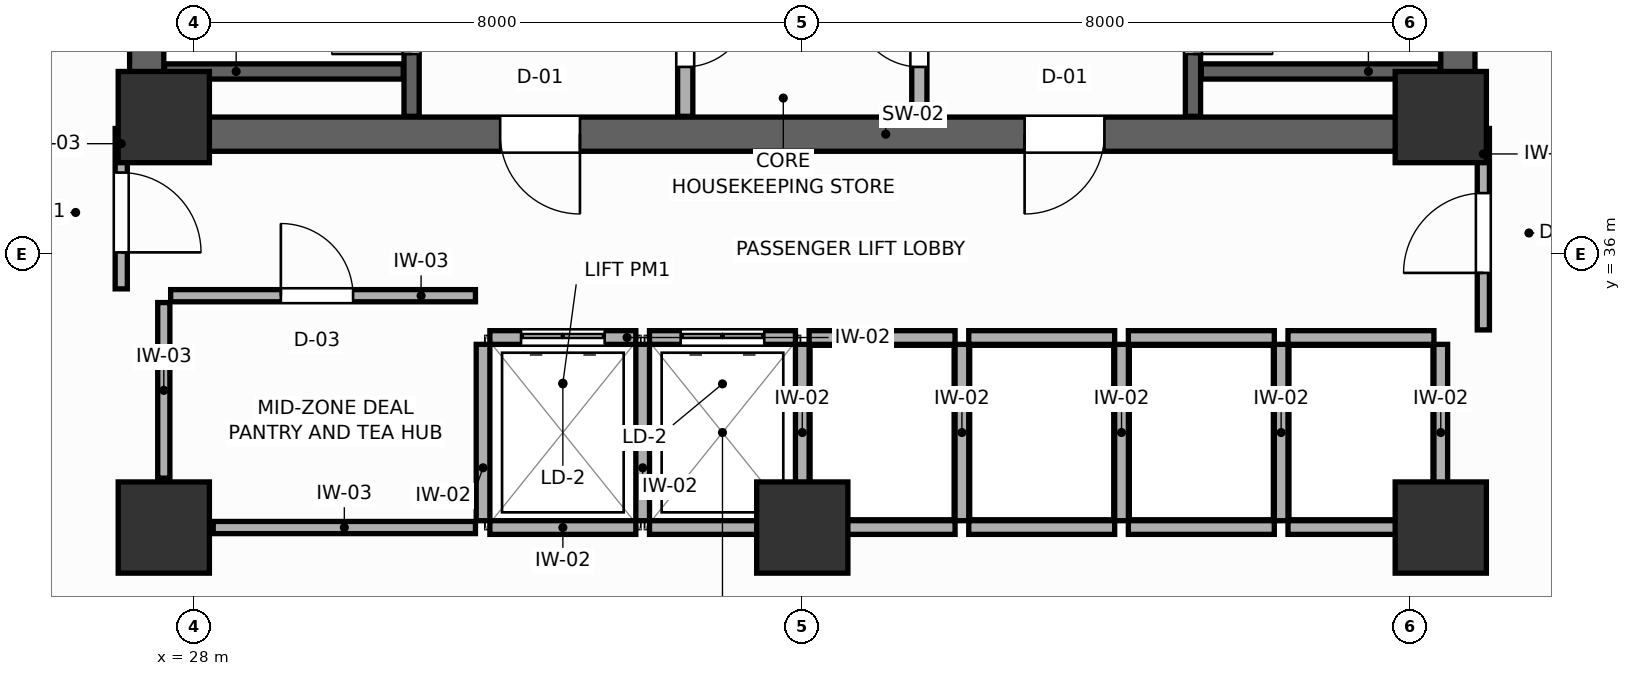
"""IFC4 building model, lengths in metres.
Left out: names, types, materials, properties, quantities, classifications, styles, units other than length and angle.
Written with IfcOpenShell. Run it as: python <this file> out.ifc"""

import sys

from ifc_helpers import new_model, si_unit, direction, frame, frame_2d, origin, origin_2d, place, context, subcontext, project, spatial, rectangle, extrude, source, transform, mapped, element, fill, save


model = new_model("IFC4")
c1 = context("Model", 3, precision=1e-05, world=origin(), true_north=direction((0.0, 1.0)))
c2 = subcontext(c1, "Body", "Model", "MODEL_VIEW")
j1 = project(units=[si_unit("LENGTHUNIT", "METRE"), si_unit("PLANEANGLEUNIT", "RADIAN")], contexts=[c1])
p1 = place(None, origin())
s1 = spatial("IfcSite", under=j1, at=p1, CompositionType="ELEMENT")
p2 = place(p1, origin())
s2 = spatial("IfcBuilding", under=s1, at=p2, CompositionType="ELEMENT")
p3 = place(p2, frame((0.0, 0.0, 147.0)))
s3 = spatial("IfcBuildingStorey", under=s2, at=p3, CompositionType="ELEMENT", Elevation=147.0)
p4 = place(p3, frame((27.15, 37.575, 0.0), z_axis=(0.0, 0.0, 1.0), x_axis=(1.0, 0.0, 0.0)))
e1 = element("IfcWall", 1, at=p4, inside=s3, PredefinedType="SHEAR", context=c2, shape_type="SweptSolid", body=[
    extrude(rectangle(XDim=17.7, YDim=0.45, at=frame_2d((8.85, 0.0))), origin(), (0.0, 0.0, 1.0), 3.6),
])
p5 = place(p4, frame((4.875, 0.0, 0.0)))
e2 = element("IfcOpeningElement", 2, at=p5, cuts=e1, PredefinedType="OPENING", context=c2, shape_type="SweptSolid", body=[
    extrude(rectangle(XDim=1.05, YDim=2.1, at=frame_2d((0.525, 1.05))), frame((0.0, 0.235, 0.0), z_axis=(0.0, -1.0, 0.0), x_axis=(1.0, 0.0, 0.0)), (0.0, 0.0, 1.0), 0.47),
])
p6 = place(p4, frame((11.775, 0.0, 0.0)))
e3 = element("IfcOpeningElement", 3, at=p6, cuts=e1, PredefinedType="OPENING", context=c2, shape_type="SweptSolid", body=[
    extrude(rectangle(XDim=1.05, YDim=2.1, at=frame_2d((0.525, 1.05))), frame((0.0, 0.235, 0.0), z_axis=(0.0, -1.0, 0.0), x_axis=(1.0, 0.0, 0.0)), (0.0, 0.0, 1.0), 0.47),
])
for number, where, z_axis, x_axis in (
    (4, (27.375, 37.8, 0.0), (0.0, 0.0, 1.0), (0.0, 1.0, 0.0)),
    (5, (44.625, 37.8, 0.0), (0.0, 0.0, 1.0), (0.0, 1.0, 0.0)),
):
    element("IfcWall", number, at=place(p3, frame(where, z_axis=z_axis, x_axis=x_axis)), inside=s3, PredefinedType="SHEAR", context=c2, shape_type="SweptSolid", body=[
        extrude(rectangle(XDim=9.0, YDim=0.45, at=frame_2d((4.5, 0.0))), origin(), (0.0, 0.0, 1.0), 3.6),
    ])
m1 = source(origin(), c2, "Body", "SweptSolid", [
    extrude(rectangle(XDim=1.2, YDim=1.2, at=origin_2d()), origin(), (0.0, 0.0, 1.0), 3.6),
])
for number, where, z_axis, x_axis in (
    (6, (27.6, 37.8, 0.0), (0.0, 0.0, 1.0), (1.0, 0.0, 0.0)),
    (7, (44.4, 37.8, 0.0), (0.0, 0.0, 1.0), (1.0, 0.0, 0.0)),
    (8, (27.6, 32.4, 0.0), (0.0, 0.0, 1.0), (1.0, 0.0, 0.0)),
    (9, (44.4, 32.4, 0.0), (0.0, 0.0, 1.0), (1.0, 0.0, 0.0)),
    (10, (36.0, 32.4, 0.0), (0.0, 0.0, 1.0), (1.0, 0.0, 0.0)),
):
    element("IfcColumn", number, at=place(p3, frame(where, z_axis=z_axis, x_axis=x_axis)), inside=s3, PredefinedType="COLUMN", context=c2, shape_type="MappedRepresentation", body=[
        mapped(m1, transform((0.0, 0.0, 0.0), scale=1.0)),
    ])
p7 = place(p3, frame((30.86, 37.81, 0.0), z_axis=(0.0, 0.0, 1.0), x_axis=(0.0, 1.0, 0.0)))
e11 = element("IfcWall", 11, at=p7, inside=s3, PredefinedType="SHEAR", context=c2, shape_type="SweptSolid", body=[
    extrude(rectangle(XDim=8.98, YDim=0.2, at=frame_2d((4.49, 0.0))), origin(), (0.0, 0.0, 1.0), 3.6),
])
p8 = place(p7, frame((0.82, 0.0, 0.0)))
e12 = element("IfcOpeningElement", 12, at=p8, cuts=e11, PredefinedType="OPENING", context=c2, shape_type="SweptSolid", body=[
    extrude(rectangle(XDim=1.05, YDim=2.1, at=frame_2d((0.525, 1.05))), frame((0.0, 0.11, 0.0), z_axis=(0.0, -1.0, 0.0), x_axis=(1.0, 0.0, 0.0)), (0.0, 0.0, 1.0), 0.22),
])
p9 = place(p3, frame((27.61, 38.4, 0.0), z_axis=(0.0, 0.0, 1.0), x_axis=(1.0, 0.0, 0.0)))
e13 = element("IfcWall", 13, at=p9, inside=s3, PredefinedType="SHEAR", context=c2, shape_type="SweptSolid", body=[
    extrude(rectangle(XDim=3.14, YDim=0.2, at=frame_2d((1.57, 0.0))), origin(), (0.0, 0.0, 1.0), 3.6),
])
p10 = place(p3, frame((41.14, 37.81, 0.0), z_axis=(0.0, 0.0, 1.0), x_axis=(0.0, 1.0, 0.0)))
e14 = element("IfcWall", 14, at=p10, inside=s3, PredefinedType="SHEAR", context=c2, shape_type="SweptSolid", body=[
    extrude(rectangle(XDim=8.98, YDim=0.2, at=frame_2d((4.49, 0.0))), origin(), (0.0, 0.0, 1.0), 3.6),
])
p11 = place(p10, frame((0.82, 0.0, 0.0)))
e15 = element("IfcOpeningElement", 15, at=p11, cuts=e14, PredefinedType="OPENING", context=c2, shape_type="SweptSolid", body=[
    extrude(rectangle(XDim=1.05, YDim=2.1, at=frame_2d((0.525, 1.05))), frame((0.0, 0.11, 0.0), z_axis=(0.0, -1.0, 0.0), x_axis=(1.0, 0.0, 0.0)), (0.0, 0.0, 1.0), 0.22),
])
p12 = place(p3, frame((41.25, 38.4, 0.0), z_axis=(0.0, 0.0, 1.0), x_axis=(1.0, 0.0, 0.0)))
e16 = element("IfcWall", 16, at=p12, inside=s3, PredefinedType="SHEAR", context=c2, shape_type="SweptSolid", body=[
    extrude(rectangle(XDim=3.14, YDim=0.2, at=frame_2d((1.57, 0.0))), origin(), (0.0, 0.0, 1.0), 3.6),
])
p13 = place(p3, frame((34.46, 37.81, 0.0), z_axis=(0.0, 0.0, 1.0), x_axis=(0.0, 1.0, 0.0)))
e17 = element("IfcWall", 17, at=p13, inside=s3, PredefinedType="PARTITIONING", context=c2, shape_type="SweptSolid", body=[
    extrude(rectangle(XDim=8.98, YDim=0.2, at=frame_2d((4.49, 0.0))), origin(), (0.0, 0.0, 1.0), 3.4),
])
p14 = place(p13, frame((0.65, 0.0, 0.0)))
e18 = element("IfcOpeningElement", 18, at=p14, cuts=e17, PredefinedType="OPENING", context=c2, shape_type="SweptSolid", body=[
    extrude(rectangle(XDim=0.85, YDim=2.05, at=frame_2d((0.425, 1.025))), frame((0.0, 0.11, 0.0), z_axis=(0.0, -1.0, 0.0), x_axis=(1.0, 0.0, 0.0)), (0.0, 0.0, 1.0), 0.22),
])
p15 = place(p3, frame((37.54, 37.81, 0.0), z_axis=(0.0, 0.0, 1.0), x_axis=(0.0, 1.0, 0.0)))
e19 = element("IfcWall", 19, at=p15, inside=s3, PredefinedType="PARTITIONING", context=c2, shape_type="SweptSolid", body=[
    extrude(rectangle(XDim=8.98, YDim=0.2, at=frame_2d((4.49, 0.0))), origin(), (0.0, 0.0, 1.0), 3.4),
])
p16 = place(p15, frame((0.65, 0.0, 0.0)))
e20 = element("IfcOpeningElement", 20, at=p16, cuts=e19, PredefinedType="OPENING", context=c2, shape_type="SweptSolid", body=[
    extrude(rectangle(XDim=0.85, YDim=2.05, at=frame_2d((0.425, 1.025))), frame((0.0, 0.11, 0.0), z_axis=(0.0, -1.0, 0.0), x_axis=(1.0, 0.0, 0.0)), (0.0, 0.0, 1.0), 0.22),
])
p17 = place(p3, frame((31.89, 34.9, 0.0), z_axis=(0.0, 0.0, 1.0), x_axis=(1.0, 0.0, 0.0)))
e21 = element("IfcWall", 21, at=p17, inside=s3, PredefinedType="PARTITIONING", context=c2, shape_type="SweptSolid", body=[
    extrude(rectangle(XDim=1.92, YDim=0.18, at=frame_2d((0.96, 0.0))), origin(), (0.0, 0.0, 1.0), 3.4),
])
p18 = place(p17, frame((0.41, 0.0, 0.0)))
e22 = element("IfcOpeningElement", 22, at=p18, cuts=e21, PredefinedType="OPENING", context=c2, shape_type="SweptSolid", body=[
    extrude(rectangle(XDim=1.1, YDim=2.1, at=frame_2d((0.55, 1.05))), frame((0.0, 0.1, 0.0), z_axis=(0.0, -1.0, 0.0), x_axis=(1.0, 0.0, 0.0)), (0.0, 0.0, 1.0), 0.2),
])
p19 = place(p3, frame((31.89, 32.4, 0.0), z_axis=(0.0, 0.0, 1.0), x_axis=(1.0, 0.0, 0.0)))
e23 = element("IfcWall", 23, at=p19, inside=s3, PredefinedType="PARTITIONING", context=c2, shape_type="SweptSolid", body=[
    extrude(rectangle(XDim=1.92, YDim=0.18, at=frame_2d((0.96, 0.0))), origin(), (0.0, 0.0, 1.0), 2.95),
])
p20 = place(p3, frame((31.8, 32.49, 0.0), z_axis=(0.0, 0.0, 1.0), x_axis=(0.0, 1.0, 0.0)))
e24 = element("IfcWall", 24, at=p20, inside=s3, PredefinedType="PARTITIONING", context=c2, shape_type="SweptSolid", body=[
    extrude(rectangle(XDim=2.32, YDim=0.18, at=frame_2d((1.16, 0.0))), origin(), (0.0, 0.0, 1.0), 3.4),
])
p21 = place(p3, frame((33.99, 34.9, 0.0), z_axis=(0.0, 0.0, 1.0), x_axis=(1.0, 0.0, 0.0)))
e25 = element("IfcWall", 25, at=p21, inside=s3, PredefinedType="PARTITIONING", context=c2, shape_type="SweptSolid", body=[
    extrude(rectangle(XDim=1.92, YDim=0.18, at=frame_2d((0.96, 0.0))), origin(), (0.0, 0.0, 1.0), 3.4),
])
p22 = place(p21, frame((0.41, 0.0, 0.0)))
e26 = element("IfcOpeningElement", 26, at=p22, cuts=e25, PredefinedType="OPENING", context=c2, shape_type="SweptSolid", body=[
    extrude(rectangle(XDim=1.1, YDim=2.1, at=frame_2d((0.55, 1.05))), frame((0.0, 0.1, 0.0), z_axis=(0.0, -1.0, 0.0), x_axis=(1.0, 0.0, 0.0)), (0.0, 0.0, 1.0), 0.2),
])
p23 = place(p3, frame((33.99, 32.4, 0.0), z_axis=(0.0, 0.0, 1.0), x_axis=(1.0, 0.0, 0.0)))
e27 = element("IfcWall", 27, at=p23, inside=s3, PredefinedType="PARTITIONING", context=c2, shape_type="SweptSolid", body=[
    extrude(rectangle(XDim=1.92, YDim=0.18, at=frame_2d((0.96, 0.0))), origin(), (0.0, 0.0, 1.0), 2.95),
])
p24 = place(p3, frame((33.9, 32.49, 0.0), z_axis=(0.0, 0.0, 1.0), x_axis=(0.0, 1.0, 0.0)))
e28 = element("IfcWall", 28, at=p24, inside=s3, PredefinedType="PARTITIONING", context=c2, shape_type="SweptSolid", body=[
    extrude(rectangle(XDim=2.32, YDim=0.18, at=frame_2d((1.16, 0.0))), origin(), (0.0, 0.0, 1.0), 3.4),
])
p25 = place(p3, frame((36.09, 34.9, 0.0), z_axis=(0.0, 0.0, 1.0), x_axis=(1.0, 0.0, 0.0)))
e29 = element("IfcWall", 29, at=p25, inside=s3, PredefinedType="PARTITIONING", context=c2, shape_type="SweptSolid", body=[
    extrude(rectangle(XDim=1.92, YDim=0.18, at=frame_2d((0.96, 0.0))), origin(), (0.0, 0.0, 1.0), 3.4),
])
p26 = place(p3, frame((36.09, 32.4, 0.0), z_axis=(0.0, 0.0, 1.0), x_axis=(1.0, 0.0, 0.0)))
e30 = element("IfcWall", 30, at=p26, inside=s3, PredefinedType="PARTITIONING", context=c2, shape_type="SweptSolid", body=[
    extrude(rectangle(XDim=1.92, YDim=0.18, at=frame_2d((0.96, 0.0))), origin(), (0.0, 0.0, 1.0), 2.95),
])
p27 = place(p3, frame((36.0, 32.49, 0.0), z_axis=(0.0, 0.0, 1.0), x_axis=(0.0, 1.0, 0.0)))
e31 = element("IfcWall", 31, at=p27, inside=s3, PredefinedType="PARTITIONING", context=c2, shape_type="SweptSolid", body=[
    extrude(rectangle(XDim=2.32, YDim=0.18, at=frame_2d((1.16, 0.0))), origin(), (0.0, 0.0, 1.0), 3.4),
])
p28 = place(p3, frame((38.19, 34.9, 0.0), z_axis=(0.0, 0.0, 1.0), x_axis=(1.0, 0.0, 0.0)))
e32 = element("IfcWall", 32, at=p28, inside=s3, PredefinedType="PARTITIONING", context=c2, shape_type="SweptSolid", body=[
    extrude(rectangle(XDim=1.92, YDim=0.18, at=frame_2d((0.96, 0.0))), origin(), (0.0, 0.0, 1.0), 3.4),
])
p29 = place(p3, frame((38.19, 32.4, 0.0), z_axis=(0.0, 0.0, 1.0), x_axis=(1.0, 0.0, 0.0)))
e33 = element("IfcWall", 33, at=p29, inside=s3, PredefinedType="PARTITIONING", context=c2, shape_type="SweptSolid", body=[
    extrude(rectangle(XDim=1.92, YDim=0.18, at=frame_2d((0.96, 0.0))), origin(), (0.0, 0.0, 1.0), 2.95),
])
p30 = place(p3, frame((38.1, 32.49, 0.0), z_axis=(0.0, 0.0, 1.0), x_axis=(0.0, 1.0, 0.0)))
e34 = element("IfcWall", 34, at=p30, inside=s3, PredefinedType="PARTITIONING", context=c2, shape_type="SweptSolid", body=[
    extrude(rectangle(XDim=2.32, YDim=0.18, at=frame_2d((1.16, 0.0))), origin(), (0.0, 0.0, 1.0), 3.4),
])
p31 = place(p3, frame((40.29, 34.9, 0.0), z_axis=(0.0, 0.0, 1.0), x_axis=(1.0, 0.0, 0.0)))
e35 = element("IfcWall", 35, at=p31, inside=s3, PredefinedType="PARTITIONING", context=c2, shape_type="SweptSolid", body=[
    extrude(rectangle(XDim=1.92, YDim=0.18, at=frame_2d((0.96, 0.0))), origin(), (0.0, 0.0, 1.0), 3.4),
])
p32 = place(p3, frame((40.29, 32.4, 0.0), z_axis=(0.0, 0.0, 1.0), x_axis=(1.0, 0.0, 0.0)))
e36 = element("IfcWall", 36, at=p32, inside=s3, PredefinedType="PARTITIONING", context=c2, shape_type="SweptSolid", body=[
    extrude(rectangle(XDim=1.92, YDim=0.18, at=frame_2d((0.96, 0.0))), origin(), (0.0, 0.0, 1.0), 2.95),
])
p33 = place(p3, frame((40.2, 32.49, 0.0), z_axis=(0.0, 0.0, 1.0), x_axis=(0.0, 1.0, 0.0)))
e37 = element("IfcWall", 37, at=p33, inside=s3, PredefinedType="PARTITIONING", context=c2, shape_type="SweptSolid", body=[
    extrude(rectangle(XDim=2.32, YDim=0.18, at=frame_2d((1.16, 0.0))), origin(), (0.0, 0.0, 1.0), 3.4),
])
p34 = place(p3, frame((42.39, 34.9, 0.0), z_axis=(0.0, 0.0, 1.0), x_axis=(1.0, 0.0, 0.0)))
e38 = element("IfcWall", 38, at=p34, inside=s3, PredefinedType="PARTITIONING", context=c2, shape_type="SweptSolid", body=[
    extrude(rectangle(XDim=1.92, YDim=0.18, at=frame_2d((0.96, 0.0))), origin(), (0.0, 0.0, 1.0), 3.4),
])
p35 = place(p3, frame((42.39, 32.4, 0.0), z_axis=(0.0, 0.0, 1.0), x_axis=(1.0, 0.0, 0.0)))
e39 = element("IfcWall", 39, at=p35, inside=s3, PredefinedType="PARTITIONING", context=c2, shape_type="SweptSolid", body=[
    extrude(rectangle(XDim=1.92, YDim=0.18, at=frame_2d((0.96, 0.0))), origin(), (0.0, 0.0, 1.0), 2.95),
])
for number, where, z_axis, x_axis in (
    (40, (42.3, 32.49, 0.0), (0.0, 0.0, 1.0), (0.0, 1.0, 0.0)),
    (41, (44.4, 32.49, 0.0), (0.0, 0.0, 1.0), (0.0, 1.0, 0.0)),
):
    element("IfcWall", number, at=place(p3, frame(where, z_axis=z_axis, x_axis=x_axis)), inside=s3, PredefinedType="PARTITIONING", context=c2, shape_type="SweptSolid", body=[
        extrude(rectangle(XDim=2.32, YDim=0.18, at=frame_2d((1.16, 0.0))), origin(), (0.0, 0.0, 1.0), 3.4),
    ])
p36 = place(p3, frame((28.25, 32.4, 0.0), z_axis=(0.0, 0.0, 1.0), x_axis=(1.0, 0.0, 0.0)))
e42 = element("IfcWall", 42, at=p36, inside=s3, PredefinedType="PARTITIONING", context=c2, shape_type="SweptSolid", body=[
    extrude(rectangle(XDim=3.45, YDim=0.16, at=frame_2d((1.725, 0.0))), origin(), (0.0, 0.0, 1.0), 2.95),
])
p37 = place(p3, frame((27.6, 33.05, 0.0), z_axis=(0.0, 0.0, 1.0), x_axis=(0.0, 1.0, 0.0)))
e43 = element("IfcWall", 43, at=p37, inside=s3, PredefinedType="PARTITIONING", context=c2, shape_type="SweptSolid", body=[
    extrude(rectangle(XDim=2.31, YDim=0.16, at=frame_2d((1.155, 0.0))), origin(), (0.0, 0.0, 1.0), 3.4),
])
p38 = place(p3, frame((27.69, 35.45, 0.0), z_axis=(0.0, 0.0, 1.0), x_axis=(1.0, 0.0, 0.0)))
e44 = element("IfcWall", 44, at=p38, inside=s3, PredefinedType="PARTITIONING", context=c2, shape_type="SweptSolid", body=[
    extrude(rectangle(XDim=4.01, YDim=0.16, at=frame_2d((2.005, 0.0))), origin(), (0.0, 0.0, 1.0), 3.4),
])
p39 = place(p38, frame((1.45, 0.0, 0.0)))
e45 = element("IfcOpeningElement", 45, at=p39, cuts=e44, PredefinedType="OPENING", context=c2, shape_type="SweptSolid", body=[
    extrude(rectangle(XDim=0.95, YDim=2.05, at=frame_2d((0.475, 1.025))), frame((0.0, 0.09, 0.0), z_axis=(0.0, -1.0, 0.0), x_axis=(1.0, 0.0, 0.0)), (0.0, 0.0, 1.0), 0.18),
])
p40 = place(p3, frame((27.04, 35.54, 0.0), z_axis=(0.0, 0.0, 1.0), x_axis=(0.0, 1.0, 0.0)))
e46 = element("IfcWall", 46, at=p40, inside=s3, PredefinedType="PARTITIONING", context=c2, shape_type="SweptSolid", body=[
    extrude(rectangle(XDim=2.11, YDim=0.16, at=frame_2d((1.055, 0.0))), origin(), (0.0, 0.0, 1.0), 3.4),
])
p41 = place(p40, frame((0.48, 0.0, 0.0)))
e47 = element("IfcOpeningElement", 47, at=p41, cuts=e46, PredefinedType="OPENING", context=c2, shape_type="SweptSolid", body=[
    extrude(rectangle(XDim=1.05, YDim=2.1, at=frame_2d((0.525, 1.05))), frame((0.0, 0.09, 0.0), z_axis=(0.0, -1.0, 0.0), x_axis=(1.0, 0.0, 0.0)), (0.0, 0.0, 1.0), 0.18),
])
p42 = place(p3, frame((44.96, 35.0, 0.0), z_axis=(0.0, 0.0, 1.0), x_axis=(0.0, 1.0, 0.0)))
e48 = element("IfcWall", 48, at=p42, inside=s3, PredefinedType="PARTITIONING", context=c2, shape_type="SweptSolid", body=[
    extrude(rectangle(XDim=2.65, YDim=0.16, at=frame_2d((1.325, 0.0))), origin(), (0.0, 0.0, 1.0), 3.4),
])
p43 = place(p42, frame((0.75, 0.0, 0.0)))
e49 = element("IfcOpeningElement", 49, at=p43, cuts=e48, PredefinedType="OPENING", context=c2, shape_type="SweptSolid", body=[
    extrude(rectangle(XDim=1.05, YDim=2.1, at=frame_2d((0.525, 1.05))), frame((0.0, 0.09, 0.0), z_axis=(0.0, -1.0, 0.0), x_axis=(1.0, 0.0, 0.0)), (0.0, 0.0, 1.0), 0.18),
])
p44 = place(p8, origin())
e50 = element("IfcDoor", 50, at=p44, inside=s3, OperationType="SINGLE_SWING_LEFT", PredefinedType="DOOR", context=c2, shape_type="SweptSolid", body=[
    extrude(rectangle(XDim=1.05, YDim=2.1, at=frame_2d((0.525, 1.05))), frame((0.0, 0.025, 0.0), z_axis=(0.0, -1.0, 0.0), x_axis=(1.0, 0.0, 0.0)), (0.0, 0.0, 1.0), 0.05),
])
fill(e12, e50)
p45 = place(p11, frame((1.05, 0.0, 0.0), z_axis=(0.0, 0.0, 1.0), x_axis=(-1.0, 0.0, 0.0)))
e51 = element("IfcDoor", 51, at=p45, inside=s3, OperationType="SINGLE_SWING_RIGHT", PredefinedType="DOOR", context=c2, shape_type="SweptSolid", body=[
    extrude(rectangle(XDim=1.05, YDim=2.1, at=frame_2d((0.525, 1.05))), frame((0.0, 0.025, 0.0), z_axis=(0.0, -1.0, 0.0), x_axis=(1.0, 0.0, 0.0)), (0.0, 0.0, 1.0), 0.05),
])
fill(e15, e51)
p46 = place(p14, frame((0.85, 0.0, 0.0), z_axis=(0.0, 0.0, 1.0), x_axis=(-1.0, 0.0, 0.0)))
e52 = element("IfcDoor", 52, at=p46, inside=s3, OperationType="SINGLE_SWING_LEFT", PredefinedType="DOOR", context=c2, shape_type="SweptSolid", body=[
    extrude(rectangle(XDim=0.85, YDim=2.05, at=frame_2d((0.425, 1.025))), frame((0.0, 0.025, 0.0), z_axis=(0.0, -1.0, 0.0), x_axis=(1.0, 0.0, 0.0)), (0.0, 0.0, 1.0), 0.05),
])
fill(e18, e52)
p47 = place(p16, origin())
e53 = element("IfcDoor", 53, at=p47, inside=s3, OperationType="SINGLE_SWING_RIGHT", PredefinedType="DOOR", context=c2, shape_type="SweptSolid", body=[
    extrude(rectangle(XDim=0.85, YDim=2.05, at=frame_2d((0.425, 1.025))), frame((0.0, 0.025, 0.0), z_axis=(0.0, -1.0, 0.0), x_axis=(1.0, 0.0, 0.0)), (0.0, 0.0, 1.0), 0.05),
])
fill(e20, e53)
p48 = place(p18, origin())
e54 = element("IfcDoor", 54, at=p48, inside=s3, OperationType="DOUBLE_DOOR_SLIDING", PredefinedType="DOOR", context=c2, shape_type="SweptSolid", body=[
    extrude(rectangle(XDim=1.1, YDim=2.1, at=frame_2d((0.55, 1.05))), frame((0.0, 0.025, 0.0), z_axis=(0.0, -1.0, 0.0), x_axis=(1.0, 0.0, 0.0)), (0.0, 0.0, 1.0), 0.05),
])
fill(e22, e54)
p49 = place(p22, origin())
e55 = element("IfcDoor", 55, at=p49, inside=s3, OperationType="DOUBLE_DOOR_SLIDING", PredefinedType="DOOR", context=c2, shape_type="SweptSolid", body=[
    extrude(rectangle(XDim=1.1, YDim=2.1, at=frame_2d((0.55, 1.05))), frame((0.0, 0.025, 0.0), z_axis=(0.0, -1.0, 0.0), x_axis=(1.0, 0.0, 0.0)), (0.0, 0.0, 1.0), 0.05),
])
fill(e26, e55)
p50 = place(p39, origin())
e56 = element("IfcDoor", 56, at=p50, inside=s3, OperationType="SINGLE_SWING_LEFT", PredefinedType="DOOR", context=c2, shape_type="SweptSolid", body=[
    extrude(rectangle(XDim=0.95, YDim=2.05, at=frame_2d((0.475, 1.025))), frame((0.0, 0.025, 0.0), z_axis=(0.0, -1.0, 0.0), x_axis=(1.0, 0.0, 0.0)), (0.0, 0.0, 1.0), 0.05),
])
fill(e45, e56)
p51 = place(p41, frame((1.05, 0.0, 0.0), z_axis=(0.0, 0.0, 1.0), x_axis=(-1.0, 0.0, 0.0)))
e57 = element("IfcDoor", 57, at=p51, inside=s3, OperationType="SINGLE_SWING_RIGHT", PredefinedType="DOOR", context=c2, shape_type="SweptSolid", body=[
    extrude(rectangle(XDim=1.05, YDim=2.1, at=frame_2d((0.525, 1.05))), frame((0.0, 0.025, 0.0), z_axis=(0.0, -1.0, 0.0), x_axis=(1.0, 0.0, 0.0)), (0.0, 0.0, 1.0), 0.05),
])
fill(e47, e57)
p52 = place(p43, origin())
e58 = element("IfcDoor", 58, at=p52, inside=s3, OperationType="SINGLE_SWING_LEFT", PredefinedType="DOOR", context=c2, shape_type="SweptSolid", body=[
    extrude(rectangle(XDim=1.05, YDim=2.1, at=frame_2d((0.525, 1.05))), frame((0.0, 0.025, 0.0), z_axis=(0.0, -1.0, 0.0), x_axis=(1.0, 0.0, 0.0)), (0.0, 0.0, 1.0), 0.05),
])
fill(e49, e58)
p53 = place(p5, frame((1.05, 0.0, 0.0), z_axis=(0.0, 0.0, 1.0), x_axis=(-1.0, 0.0, 0.0)))
e59 = element("IfcDoor", 59, at=p53, inside=s3, OperationType="SINGLE_SWING_LEFT", PredefinedType="DOOR", context=c2, shape_type="SweptSolid", body=[
    extrude(rectangle(XDim=1.05, YDim=2.1, at=frame_2d((0.525, 1.05))), frame((0.0, 0.025, 0.0), z_axis=(0.0, -1.0, 0.0), x_axis=(1.0, 0.0, 0.0)), (0.0, 0.0, 1.0), 0.05),
])
fill(e2, e59)
p54 = place(p6, frame((1.05, 0.0, 0.0), z_axis=(0.0, 0.0, 1.0), x_axis=(-1.0, 0.0, 0.0)))
e60 = element("IfcDoor", 60, at=p54, inside=s3, OperationType="SINGLE_SWING_RIGHT", PredefinedType="DOOR", context=c2, shape_type="SweptSolid", body=[
    extrude(rectangle(XDim=1.05, YDim=2.1, at=frame_2d((0.525, 1.05))), frame((0.0, 0.025, 0.0), z_axis=(0.0, -1.0, 0.0), x_axis=(1.0, 0.0, 0.0)), (0.0, 0.0, 1.0), 0.05),
])
fill(e3, e60)
save(model, sys.argv[1])
